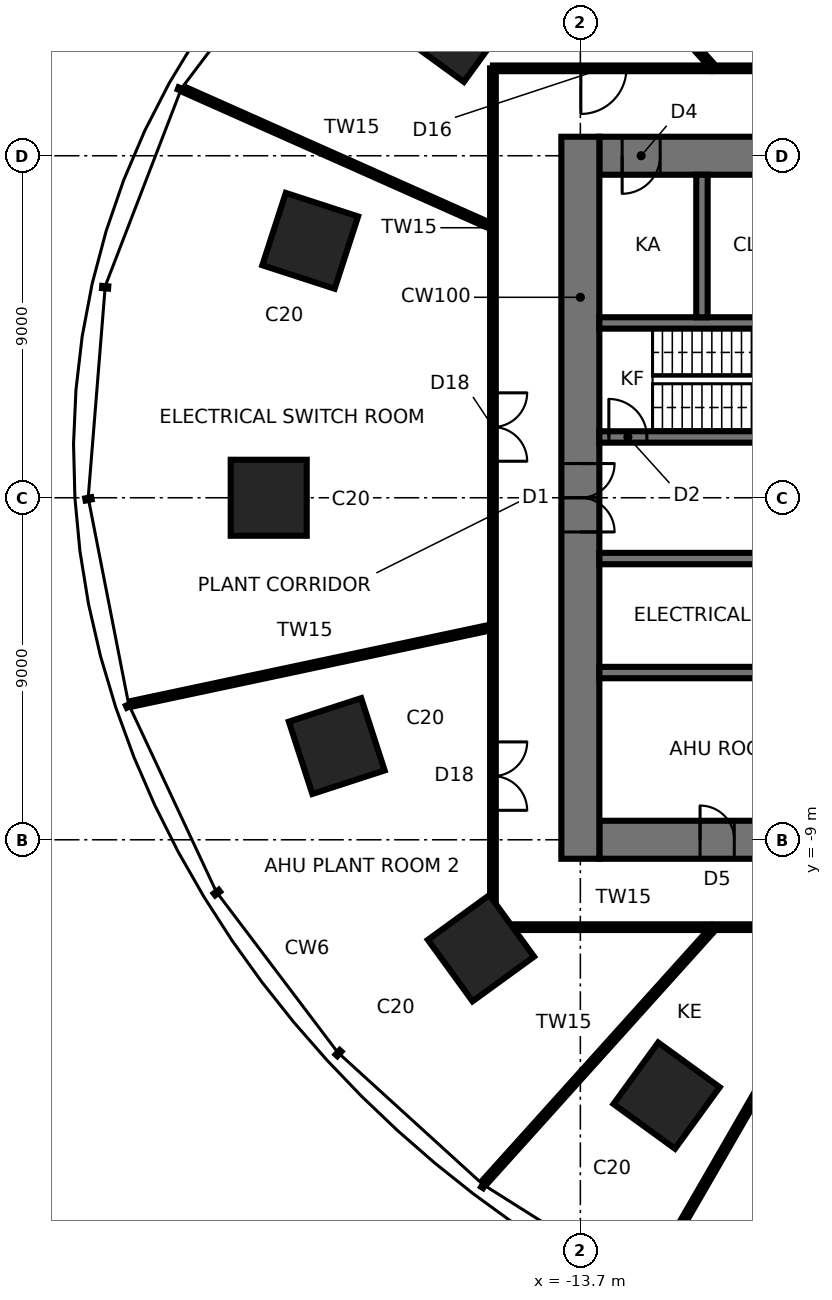
"""IFC4 building model, lengths in metres.
Left out: names, types, materials, properties, quantities, classifications, styles, units other than length and angle.
Written with IfcOpenShell. Run it as: python <this file> out.ifc"""

import sys

from ifc_helpers import new_model, si_unit, direction, frame, frame_2d, origin, origin_2d, place, context, subcontext, project, spatial, rectangle, extrude, element, fill, save


model = new_model("IFC4")
c1 = context("Model", 3, precision=1e-05, world=origin(), true_north=direction((0.0, 1.0)))
c2 = subcontext(c1, "Body", "Model", "MODEL_VIEW")
j1 = project(units=[si_unit("LENGTHUNIT", "METRE"), si_unit("PLANEANGLEUNIT", "RADIAN")], contexts=[c1])
p1 = place(None, origin())
s1 = spatial("IfcSite", under=j1, at=p1, CompositionType="ELEMENT")
p2 = place(p1, origin())
s2 = spatial("IfcBuilding", under=s1, at=p2, CompositionType="ELEMENT")
p3 = place(p2, frame((0.0, 0.0, 86.8)))
s3 = spatial("IfcBuildingStorey", under=s2, at=p3, CompositionType="ELEMENT", Elevation=86.8)
for number, where, z_axis, x_axis in (
    (1, (-16.986, 12.341, 0.0), (0.0, 0.0, 1.0), (-0.809, 0.588, 0.0)),
    (2, (-20.808, 6.761, 0.0), (0.0, 0.0, 1.0), (-0.951, 0.309, 0.0)),
    (3, (-21.9, 0.0, 0.0), (0.0, 0.0, 1.0), (-1.0, 0.0, 0.0)),
    (4, (-20.109, -6.534, 0.0), (0.0, 0.0, 1.0), (-0.951, -0.309, 0.0)),
    (5, (-16.315, -11.854, 0.0), (0.0, 0.0, 1.0), (-0.809, -0.588, 0.0)),
    (6, (-11.43, -15.733, 0.0), (0.0, 0.0, 1.0), (-0.588, -0.809, 0.0)),
):
    element("IfcColumn", number, at=place(p3, frame(where, z_axis=z_axis, x_axis=x_axis)), inside=s3, PredefinedType="COLUMN", context=c2, shape_type="SweptSolid", body=[
        extrude(rectangle(XDim=2.0, YDim=2.0, at=origin_2d()), origin(), (0.0, 0.0, 1.0), 5.6),
    ])
p4 = place(p3, frame((-13.2, -9.0, 0.0), z_axis=(0.0, 0.0, 1.0), x_axis=(1.0, 0.0, 0.0)))
e7 = element("IfcWall", 7, at=p4, inside=s3, PredefinedType="SHEAR", context=c2, shape_type="SweptSolid", body=[
    extrude(rectangle(XDim=26.4, YDim=1.0, at=frame_2d((13.2, 0.0))), origin(), (0.0, 0.0, 1.0), 5.6),
])
p5 = place(p4, frame((2.65, 0.0, 0.0)))
e8 = element("IfcOpeningElement", 8, at=p5, cuts=e7, PredefinedType="OPENING", context=c2, shape_type="SweptSolid", body=[
    extrude(rectangle(XDim=0.9, YDim=2.1, at=frame_2d((0.45, 1.05))), frame((0.0, 0.51, 0.0), z_axis=(0.0, -1.0, 0.0), x_axis=(1.0, 0.0, 0.0)), (0.0, 0.0, 1.0), 1.02),
])
p6 = place(p4, frame((9.5, 0.0, 0.0)))
e9 = element("IfcOpeningElement", 9, at=p6, cuts=e7, PredefinedType="OPENING", context=c2, shape_type="SweptSolid", body=[
    extrude(rectangle(XDim=0.9, YDim=2.1, at=frame_2d((0.45, 1.05))), frame((0.0, 0.51, 0.0), z_axis=(0.0, -1.0, 0.0), x_axis=(1.0, 0.0, 0.0)), (0.0, 0.0, 1.0), 1.02),
])
p7 = place(p4, frame((16.0, 0.0, 0.0)))
e10 = element("IfcOpeningElement", 10, at=p7, cuts=e7, PredefinedType="OPENING", context=c2, shape_type="SweptSolid", body=[
    extrude(rectangle(XDim=0.9, YDim=2.1, at=frame_2d((0.45, 1.05))), frame((0.0, 0.51, 0.0), z_axis=(0.0, -1.0, 0.0), x_axis=(1.0, 0.0, 0.0)), (0.0, 0.0, 1.0), 1.02),
])
p8 = place(p4, frame((22.85, 0.0, 0.0)))
e11 = element("IfcOpeningElement", 11, at=p8, cuts=e7, PredefinedType="OPENING", context=c2, shape_type="SweptSolid", body=[
    extrude(rectangle(XDim=0.9, YDim=2.1, at=frame_2d((0.45, 1.05))), frame((0.0, 0.51, 0.0), z_axis=(0.0, -1.0, 0.0), x_axis=(1.0, 0.0, 0.0)), (0.0, 0.0, 1.0), 1.02),
])
p9 = place(p3, frame((13.2, 9.0, 0.0), z_axis=(0.0, 0.0, 1.0), x_axis=(-1.0, 0.0, 0.0)))
e12 = element("IfcWall", 12, at=p9, inside=s3, PredefinedType="SHEAR", context=c2, shape_type="SweptSolid", body=[
    extrude(rectangle(XDim=26.4, YDim=1.0, at=frame_2d((13.2, 0.0))), origin(), (0.0, 0.0, 1.0), 5.6),
])
p10 = place(p9, frame((2.65, 0.0, 0.0)))
e13 = element("IfcOpeningElement", 13, at=p10, cuts=e12, PredefinedType="OPENING", context=c2, shape_type="SweptSolid", body=[
    extrude(rectangle(XDim=0.9, YDim=2.1, at=frame_2d((0.45, 1.05))), frame((0.0, 0.51, 0.0), z_axis=(0.0, -1.0, 0.0), x_axis=(1.0, 0.0, 0.0)), (0.0, 0.0, 1.0), 1.02),
])
p11 = place(p9, frame((9.5, 0.0, 0.0)))
e14 = element("IfcOpeningElement", 14, at=p11, cuts=e12, PredefinedType="OPENING", context=c2, shape_type="SweptSolid", body=[
    extrude(rectangle(XDim=0.9, YDim=2.1, at=frame_2d((0.45, 1.05))), frame((0.0, 0.51, 0.0), z_axis=(0.0, -1.0, 0.0), x_axis=(1.0, 0.0, 0.0)), (0.0, 0.0, 1.0), 1.02),
])
p12 = place(p9, frame((16.0, 0.0, 0.0)))
e15 = element("IfcOpeningElement", 15, at=p12, cuts=e12, PredefinedType="OPENING", context=c2, shape_type="SweptSolid", body=[
    extrude(rectangle(XDim=0.9, YDim=2.1, at=frame_2d((0.45, 1.05))), frame((0.0, 0.51, 0.0), z_axis=(0.0, -1.0, 0.0), x_axis=(1.0, 0.0, 0.0)), (0.0, 0.0, 1.0), 1.02),
])
p13 = place(p9, frame((21.25, 0.0, 0.0)))
e16 = element("IfcOpeningElement", 16, at=p13, cuts=e12, PredefinedType="OPENING", context=c2, shape_type="SweptSolid", body=[
    extrude(rectangle(XDim=0.9, YDim=2.1, at=frame_2d((0.45, 1.05))), frame((0.0, 0.51, 0.0), z_axis=(0.0, -1.0, 0.0), x_axis=(1.0, 0.0, 0.0)), (0.0, 0.0, 1.0), 1.02),
])
p14 = place(p9, frame((24.8, 0.0, 0.0)))
e17 = element("IfcOpeningElement", 17, at=p14, cuts=e12, PredefinedType="OPENING", context=c2, shape_type="SweptSolid", body=[
    extrude(rectangle(XDim=1.0, YDim=2.1, at=frame_2d((0.5, 1.05))), frame((0.0, 0.51, 0.0), z_axis=(0.0, -1.0, 0.0), x_axis=(1.0, 0.0, 0.0)), (0.0, 0.0, 1.0), 1.02),
])
p15 = place(p3, frame((-13.7, 9.5, 0.0), z_axis=(0.0, 0.0, 1.0), x_axis=(0.0, -1.0, 0.0)))
e18 = element("IfcWall", 18, at=p15, inside=s3, PredefinedType="SHEAR", context=c2, shape_type="SweptSolid", body=[
    extrude(rectangle(XDim=19.0, YDim=1.0, at=frame_2d((9.5, 0.0))), origin(), (0.0, 0.0, 1.0), 5.6),
])
p16 = place(p15, frame((8.6, 0.0, 0.0)))
e19 = element("IfcOpeningElement", 19, at=p16, cuts=e18, PredefinedType="OPENING", context=c2, shape_type="SweptSolid", body=[
    extrude(rectangle(XDim=1.8, YDim=2.4, at=frame_2d((0.9, 1.2))), frame((0.0, 0.51, 0.0), z_axis=(0.0, -1.0, 0.0), x_axis=(1.0, 0.0, 0.0)), (0.0, 0.0, 1.0), 1.02),
])
p17 = place(p3, frame((-13.2, 1.6, 0.0), z_axis=(0.0, 0.0, 1.0), x_axis=(1.0, 0.0, 0.0)))
e20 = element("IfcWall", 20, at=p17, inside=s3, PredefinedType="SHEAR", context=c2, shape_type="SweptSolid", body=[
    extrude(rectangle(XDim=26.4, YDim=0.3, at=frame_2d((13.2, 0.0))), origin(), (0.0, 0.0, 1.0), 5.6),
])
p18 = place(p17, frame((0.25, 0.0, 0.0)))
e21 = element("IfcOpeningElement", 21, at=p18, cuts=e20, PredefinedType="OPENING", context=c2, shape_type="SweptSolid", body=[
    extrude(rectangle(XDim=1.0, YDim=2.1, at=frame_2d((0.5, 1.05))), frame((0.0, 0.16, 0.0), z_axis=(0.0, -1.0, 0.0), x_axis=(1.0, 0.0, 0.0)), (0.0, 0.0, 1.0), 0.32),
])
p19 = place(p17, frame((20.25, 0.0, 0.0)))
e22 = element("IfcOpeningElement", 22, at=p19, cuts=e20, PredefinedType="OPENING", context=c2, shape_type="SweptSolid", body=[
    extrude(rectangle(XDim=1.5, YDim=2.4, at=frame_2d((0.75, 1.2))), frame((0.0, 0.16, 0.0), z_axis=(0.0, -1.0, 0.0), x_axis=(1.0, 0.0, 0.0)), (0.0, 0.0, 1.0), 0.32),
])
p20 = place(p17, frame((7.55, 0.0, 0.0)))
e23 = element("IfcOpeningElement", 23, at=p20, cuts=e20, PredefinedType="OPENING", context=c2, shape_type="SweptSolid", body=[
    extrude(rectangle(XDim=0.9, YDim=2.1, at=frame_2d((0.45, 1.05))), frame((0.0, 0.16, 0.0), z_axis=(0.0, -1.0, 0.0), x_axis=(1.0, 0.0, 0.0)), (0.0, 0.0, 1.0), 0.32),
])
p21 = place(p17, frame((10.15, 0.0, 0.0)))
e24 = element("IfcOpeningElement", 24, at=p21, cuts=e20, PredefinedType="OPENING", context=c2, shape_type="SweptSolid", body=[
    extrude(rectangle(XDim=0.9, YDim=2.1, at=frame_2d((0.45, 1.05))), frame((0.0, 0.16, 0.0), z_axis=(0.0, -1.0, 0.0), x_axis=(1.0, 0.0, 0.0)), (0.0, 0.0, 1.0), 0.32),
])
p22 = place(p17, frame((12.75, 0.0, 0.0)))
e25 = element("IfcOpeningElement", 25, at=p22, cuts=e20, PredefinedType="OPENING", context=c2, shape_type="SweptSolid", body=[
    extrude(rectangle(XDim=0.9, YDim=2.1, at=frame_2d((0.45, 1.05))), frame((0.0, 0.16, 0.0), z_axis=(0.0, -1.0, 0.0), x_axis=(1.0, 0.0, 0.0)), (0.0, 0.0, 1.0), 0.32),
])
p23 = place(p17, frame((24.15, 0.0, 0.0)))
e26 = element("IfcOpeningElement", 26, at=p23, cuts=e20, PredefinedType="OPENING", context=c2, shape_type="SweptSolid", body=[
    extrude(rectangle(XDim=0.9, YDim=2.1, at=frame_2d((0.45, 1.05))), frame((0.0, 0.16, 0.0), z_axis=(0.0, -1.0, 0.0), x_axis=(1.0, 0.0, 0.0)), (0.0, 0.0, 1.0), 0.32),
])
p24 = place(p3, frame((-13.2, -1.6, 0.0), z_axis=(0.0, 0.0, 1.0), x_axis=(1.0, 0.0, 0.0)))
e27 = element("IfcWall", 27, at=p24, inside=s3, PredefinedType="SHEAR", context=c2, shape_type="SweptSolid", body=[
    extrude(rectangle(XDim=26.4, YDim=0.3, at=frame_2d((13.2, 0.0))), origin(), (0.0, 0.0, 1.0), 5.6),
])
p25 = place(p24, frame((25.15, 0.0, 0.0)))
e28 = element("IfcOpeningElement", 28, at=p25, cuts=e27, PredefinedType="OPENING", context=c2, shape_type="SweptSolid", body=[
    extrude(rectangle(XDim=1.0, YDim=2.1, at=frame_2d((0.5, 1.05))), frame((0.0, 0.16, 0.0), z_axis=(0.0, -1.0, 0.0), x_axis=(1.0, 0.0, 0.0)), (0.0, 0.0, 1.0), 0.32),
])
p26 = place(p24, frame((15.25, 0.0, 0.0)))
e29 = element("IfcOpeningElement", 29, at=p26, cuts=e27, PredefinedType="OPENING", context=c2, shape_type="SweptSolid", body=[
    extrude(rectangle(XDim=1.1, YDim=2.3, at=frame_2d((0.55, 1.15))), frame((0.0, 0.16, 0.0), z_axis=(0.0, -1.0, 0.0), x_axis=(1.0, 0.0, 0.0)), (0.0, 0.0, 1.0), 0.32),
])
p27 = place(p24, frame((17.85, 0.0, 0.0)))
e30 = element("IfcOpeningElement", 30, at=p27, cuts=e27, PredefinedType="OPENING", context=c2, shape_type="SweptSolid", body=[
    extrude(rectangle(XDim=1.1, YDim=2.3, at=frame_2d((0.55, 1.15))), frame((0.0, 0.16, 0.0), z_axis=(0.0, -1.0, 0.0), x_axis=(1.0, 0.0, 0.0)), (0.0, 0.0, 1.0), 0.32),
])
p28 = place(p24, frame((5.55, 0.0, 0.0)))
e31 = element("IfcOpeningElement", 31, at=p28, cuts=e27, PredefinedType="OPENING", context=c2, shape_type="SweptSolid", body=[
    extrude(rectangle(XDim=0.9, YDim=2.1, at=frame_2d((0.45, 1.05))), frame((0.0, 0.16, 0.0), z_axis=(0.0, -1.0, 0.0), x_axis=(1.0, 0.0, 0.0)), (0.0, 0.0, 1.0), 0.32),
])
for number, where, z_axis, x_axis in (
    (32, (-13.2, 4.6, 0.0), (0.0, 0.0, 1.0), (1.0, 0.0, 0.0)),
    (33, (-13.2, -4.6, 0.0), (0.0, 0.0, 1.0), (1.0, 0.0, 0.0)),
):
    element("IfcWall", number, at=place(p3, frame(where, z_axis=z_axis, x_axis=x_axis)), inside=s3, PredefinedType="SHEAR", context=c2, shape_type="SweptSolid", body=[
        extrude(rectangle(XDim=26.4, YDim=0.3, at=frame_2d((13.2, 0.0))), origin(), (0.0, 0.0, 1.0), 5.6),
    ])
p29 = place(p3, frame((-10.5, 4.75, 0.0), z_axis=(0.0, 0.0, 1.0), x_axis=(0.0, 1.0, 0.0)))
e34 = element("IfcWall", 34, at=p29, inside=s3, PredefinedType="SHEAR", context=c2, shape_type="SweptSolid", body=[
    extrude(rectangle(XDim=3.75, YDim=0.3, at=frame_2d((1.875, 0.0))), origin(), (0.0, 0.0, 1.0), 5.6),
])
p30 = place(p3, frame((-16.0, -3.401, 0.0), z_axis=(0.0, 0.0, 1.0), x_axis=(-0.978145186273, -0.207923049637, 0.0)))
e35 = element("IfcWall", 35, at=p30, inside=s3, PredefinedType="PARTITIONING", context=c2, shape_type="SweptSolid", body=[
    extrude(rectangle(XDim=9.719, YDim=0.15, at=frame_2d((4.859, 0.0))), origin(), (0.0, 0.0, 1.0), 5.4),
])
p31 = place(p3, frame((-10.175, -11.3, 0.0), z_axis=(0.0, 0.0, 1.0), x_axis=(-0.669136564673, -0.743139460544, 0.0)))
e36 = element("IfcWall", 36, at=p31, inside=s3, PredefinedType="PARTITIONING", context=c2, shape_type="SweptSolid", body=[
    extrude(rectangle(XDim=9.026, YDim=0.15, at=frame_2d((4.513, 0.0))), origin(), (0.0, 0.0, 1.0), 5.4),
])
p32 = place(p3, frame((-6.524, -11.3, 0.0), z_axis=(0.0, 0.0, 1.0), x_axis=(-0.499989292232, -0.866031585829, 0.0)))
e37 = element("IfcWall", 37, at=p32, inside=s3, PredefinedType="PARTITIONING", context=c2, shape_type="SweptSolid", body=[
    extrude(rectangle(XDim=10.85, YDim=0.15, at=frame_2d((5.425, 0.0))), origin(), (0.0, 0.0, 1.0), 5.4),
])
p33 = place(p3, frame((-16.0, -11.3, 0.0), z_axis=(0.0, 0.0, 1.0), x_axis=(1.0, 0.0, 0.0)))
e38 = element("IfcWall", 38, at=p33, inside=s3, PredefinedType="PARTITIONING", context=c2, shape_type="SweptSolid", body=[
    extrude(rectangle(XDim=32.0, YDim=0.15, at=frame_2d((16.0, 0.0))), origin(), (0.0, 0.0, 1.0), 5.4),
])
p34 = place(p33, frame((7.026, 0.0, 0.0)))
e39 = element("IfcOpeningElement", 39, at=p34, cuts=e38, PredefinedType="OPENING", context=c2, shape_type="SweptSolid", body=[
    extrude(rectangle(XDim=1.2, YDim=2.1, at=frame_2d((0.6, 1.05))), frame((0.0, 0.085, 0.0), z_axis=(0.0, -1.0, 0.0), x_axis=(1.0, 0.0, 0.0)), (0.0, 0.0, 1.0), 0.17),
])
p35 = place(p33, frame((11.544, 0.0, 0.0)))
e40 = element("IfcOpeningElement", 40, at=p35, cuts=e38, PredefinedType="OPENING", context=c2, shape_type="SweptSolid", body=[
    extrude(rectangle(XDim=1.2, YDim=2.1, at=frame_2d((0.6, 1.05))), frame((0.0, 0.085, 0.0), z_axis=(0.0, -1.0, 0.0), x_axis=(1.0, 0.0, 0.0)), (0.0, 0.0, 1.0), 0.17),
])
p36 = place(p33, frame((17.768, 0.0, 0.0)))
e41 = element("IfcOpeningElement", 41, at=p36, cuts=e38, PredefinedType="OPENING", context=c2, shape_type="SweptSolid", body=[
    extrude(rectangle(XDim=1.8, YDim=2.4, at=frame_2d((0.9, 1.2))), frame((0.0, 0.085, 0.0), z_axis=(0.0, -1.0, 0.0), x_axis=(1.0, 0.0, 0.0)), (0.0, 0.0, 1.0), 0.17),
])
p37 = place(p33, frame((26.387, 0.0, 0.0)))
e42 = element("IfcOpeningElement", 42, at=p37, cuts=e38, PredefinedType="OPENING", context=c2, shape_type="SweptSolid", body=[
    extrude(rectangle(XDim=1.8, YDim=2.4, at=frame_2d((0.9, 1.2))), frame((0.0, 0.085, 0.0), z_axis=(0.0, -1.0, 0.0), x_axis=(1.0, 0.0, 0.0)), (0.0, 0.0, 1.0), 0.17),
])
p38 = place(p3, frame((16.0, 11.3, 0.0), z_axis=(0.0, 0.0, 1.0), x_axis=(-1.0, 0.0, 0.0)))
e43 = element("IfcWall", 43, at=p38, inside=s3, PredefinedType="PARTITIONING", context=c2, shape_type="SweptSolid", body=[
    extrude(rectangle(XDim=32.0, YDim=0.15, at=frame_2d((16.0, 0.0))), origin(), (0.0, 0.0, 1.0), 5.4),
])
p39 = place(p38, frame((7.026, 0.0, 0.0)))
e44 = element("IfcOpeningElement", 44, at=p39, cuts=e43, PredefinedType="OPENING", context=c2, shape_type="SweptSolid", body=[
    extrude(rectangle(XDim=1.2, YDim=2.1, at=frame_2d((0.6, 1.05))), frame((0.0, 0.085, 0.0), z_axis=(0.0, -1.0, 0.0), x_axis=(1.0, 0.0, 0.0)), (0.0, 0.0, 1.0), 0.17),
])
p40 = place(p38, frame((11.544, 0.0, 0.0)))
e45 = element("IfcOpeningElement", 45, at=p40, cuts=e43, PredefinedType="OPENING", context=c2, shape_type="SweptSolid", body=[
    extrude(rectangle(XDim=1.2, YDim=2.1, at=frame_2d((0.6, 1.05))), frame((0.0, 0.085, 0.0), z_axis=(0.0, -1.0, 0.0), x_axis=(1.0, 0.0, 0.0)), (0.0, 0.0, 1.0), 0.17),
])
p41 = place(p38, frame((19.618, 0.0, 0.0)))
e46 = element("IfcOpeningElement", 46, at=p41, cuts=e43, PredefinedType="OPENING", context=c2, shape_type="SweptSolid", body=[
    extrude(rectangle(XDim=1.8, YDim=2.4, at=frame_2d((0.9, 1.2))), frame((0.0, 0.085, 0.0), z_axis=(0.0, -1.0, 0.0), x_axis=(1.0, 0.0, 0.0)), (0.0, 0.0, 1.0), 0.17),
])
p42 = place(p38, frame((28.487, 0.0, 0.0)))
e47 = element("IfcOpeningElement", 47, at=p42, cuts=e43, PredefinedType="OPENING", context=c2, shape_type="SweptSolid", body=[
    extrude(rectangle(XDim=1.2, YDim=2.1, at=frame_2d((0.6, 1.05))), frame((0.0, 0.085, 0.0), z_axis=(0.0, -1.0, 0.0), x_axis=(1.0, 0.0, 0.0)), (0.0, 0.0, 1.0), 0.17),
])
p43 = place(p3, frame((-10.175, 11.3, 0.0), z_axis=(0.0, 0.0, 1.0), x_axis=(-0.669134495154, 0.743141323972, 0.0)))
e48 = element("IfcWall", 48, at=p43, inside=s3, PredefinedType="PARTITIONING", context=c2, shape_type="SweptSolid", body=[
    extrude(rectangle(XDim=9.613, YDim=0.15, at=frame_2d((4.807, 0.0))), origin(), (0.0, 0.0, 1.0), 5.4),
])
p44 = place(p3, frame((-16.0, 7.124, 0.0), z_axis=(0.0, 0.0, 1.0), x_axis=(-0.913550959064, 0.406724286457, 0.0)))
e49 = element("IfcWall", 49, at=p44, inside=s3, PredefinedType="PARTITIONING", context=c2, shape_type="SweptSolid", body=[
    extrude(rectangle(XDim=8.892, YDim=0.15, at=frame_2d((4.446, 0.0))), origin(), (0.0, 0.0, 1.0), 5.4),
])
p45 = place(p3, frame((-16.0, 11.3, 0.0), z_axis=(0.0, 0.0, 1.0), x_axis=(0.0, -1.0, 0.0)))
e50 = element("IfcWall", 50, at=p45, inside=s3, PredefinedType="PARTITIONING", context=c2, shape_type="SweptSolid", body=[
    extrude(rectangle(XDim=22.6, YDim=0.15, at=frame_2d((11.3, 0.0))), origin(), (0.0, 0.0, 1.0), 5.4),
])
p46 = place(p45, frame((8.539, 0.0, 0.0)))
e51 = element("IfcOpeningElement", 51, at=p46, cuts=e50, PredefinedType="OPENING", context=c2, shape_type="SweptSolid", body=[
    extrude(rectangle(XDim=1.8, YDim=2.4, at=frame_2d((0.9, 1.2))), frame((0.0, 0.085, 0.0), z_axis=(0.0, -1.0, 0.0), x_axis=(1.0, 0.0, 0.0)), (0.0, 0.0, 1.0), 0.17),
])
p47 = place(p45, frame((17.725, 0.0, 0.0)))
e52 = element("IfcOpeningElement", 52, at=p47, cuts=e50, PredefinedType="OPENING", context=c2, shape_type="SweptSolid", body=[
    extrude(rectangle(XDim=1.8, YDim=2.4, at=frame_2d((0.9, 1.2))), frame((0.0, 0.085, 0.0), z_axis=(0.0, -1.0, 0.0), x_axis=(1.0, 0.0, 0.0)), (0.0, 0.0, 1.0), 0.17),
])
p48 = place(p16, origin())
e53 = element("IfcDoor", 53, at=p48, inside=s3, OperationType="DOUBLE_DOOR_SINGLE_SWING", PredefinedType="DOOR", context=c2, shape_type="SweptSolid", body=[
    extrude(rectangle(XDim=1.72, YDim=2.36, at=frame_2d((0.9, 1.18))), frame((0.0, 0.025, 0.0), z_axis=(0.0, -1.0, 0.0), x_axis=(1.0, 0.0, 0.0)), (0.0, 0.0, 1.0), 0.05),
    extrude(rectangle(XDim=0.04, YDim=2.4, at=frame_2d((0.02, 1.2))), frame((0.0, 0.25, 0.0), z_axis=(0.0, -1.0, 0.0), x_axis=(1.0, 0.0, 0.0)), (0.0, 0.0, 1.0), 0.5),
    extrude(rectangle(XDim=0.04, YDim=2.4, at=frame_2d((1.78, 1.2))), frame((0.0, 0.25, 0.0), z_axis=(0.0, -1.0, 0.0), x_axis=(1.0, 0.0, 0.0)), (0.0, 0.0, 1.0), 0.5),
    extrude(rectangle(XDim=1.72, YDim=0.04, at=frame_2d((0.9, 2.38))), frame((0.0, 0.25, 0.0), z_axis=(0.0, -1.0, 0.0), x_axis=(1.0, 0.0, 0.0)), (0.0, 0.0, 1.0), 0.5),
])
fill(e19, e53)
p49 = place(p18, origin())
e54 = element("IfcDoor", 54, at=p49, inside=s3, OperationType="SINGLE_SWING_LEFT", PredefinedType="DOOR", context=c2, shape_type="SweptSolid", body=[
    extrude(rectangle(XDim=1.0, YDim=2.1, at=frame_2d((0.5, 1.05))), frame((0.0, 0.025, 0.0), z_axis=(0.0, -1.0, 0.0), x_axis=(1.0, 0.0, 0.0)), (0.0, 0.0, 1.0), 0.05),
])
fill(e21, e54)
p50 = place(p14, origin())
e55 = element("IfcDoor", 55, at=p50, inside=s3, OperationType="SINGLE_SWING_RIGHT", PredefinedType="DOOR", context=c2, shape_type="SweptSolid", body=[
    extrude(rectangle(XDim=0.92, YDim=2.06, at=frame_2d((0.5, 1.03))), frame((0.0, 0.025, 0.0), z_axis=(0.0, -1.0, 0.0), x_axis=(1.0, 0.0, 0.0)), (0.0, 0.0, 1.0), 0.05),
    extrude(rectangle(XDim=0.04, YDim=2.1, at=frame_2d((0.02, 1.05))), frame((0.0, 0.25, 0.0), z_axis=(0.0, -1.0, 0.0), x_axis=(1.0, 0.0, 0.0)), (0.0, 0.0, 1.0), 0.5),
    extrude(rectangle(XDim=0.04, YDim=2.1, at=frame_2d((0.98, 1.05))), frame((0.0, 0.25, 0.0), z_axis=(0.0, -1.0, 0.0), x_axis=(1.0, 0.0, 0.0)), (0.0, 0.0, 1.0), 0.5),
    extrude(rectangle(XDim=0.92, YDim=0.04, at=frame_2d((0.5, 2.08))), frame((0.0, 0.25, 0.0), z_axis=(0.0, -1.0, 0.0), x_axis=(1.0, 0.0, 0.0)), (0.0, 0.0, 1.0), 0.5),
])
fill(e17, e55)
p51 = place(p5, origin())
e56 = element("IfcDoor", 56, at=p51, inside=s3, OperationType="SINGLE_SWING_LEFT", PredefinedType="DOOR", context=c2, shape_type="SweptSolid", body=[
    extrude(rectangle(XDim=0.82, YDim=2.06, at=frame_2d((0.45, 1.03))), frame((0.0, 0.025, 0.0), z_axis=(0.0, -1.0, 0.0), x_axis=(1.0, 0.0, 0.0)), (0.0, 0.0, 1.0), 0.05),
    extrude(rectangle(XDim=0.04, YDim=2.1, at=frame_2d((0.02, 1.05))), frame((0.0, 0.25, 0.0), z_axis=(0.0, -1.0, 0.0), x_axis=(1.0, 0.0, 0.0)), (0.0, 0.0, 1.0), 0.5),
    extrude(rectangle(XDim=0.04, YDim=2.1, at=frame_2d((0.88, 1.05))), frame((0.0, 0.25, 0.0), z_axis=(0.0, -1.0, 0.0), x_axis=(1.0, 0.0, 0.0)), (0.0, 0.0, 1.0), 0.5),
    extrude(rectangle(XDim=0.82, YDim=0.04, at=frame_2d((0.45, 2.08))), frame((0.0, 0.25, 0.0), z_axis=(0.0, -1.0, 0.0), x_axis=(1.0, 0.0, 0.0)), (0.0, 0.0, 1.0), 0.5),
])
fill(e8, e56)
p52 = place(p42, origin())
e57 = element("IfcDoor", 57, at=p52, inside=s3, OperationType="SINGLE_SWING_RIGHT", PredefinedType="DOOR", context=c2, shape_type="SweptSolid", body=[
    extrude(rectangle(XDim=1.2, YDim=2.1, at=frame_2d((0.6, 1.05))), frame((0.0, 0.025, 0.0), z_axis=(0.0, -1.0, 0.0), x_axis=(1.0, 0.0, 0.0)), (0.0, 0.0, 1.0), 0.05),
])
fill(e47, e57)
p53 = place(p46, origin())
e58 = element("IfcDoor", 58, at=p53, inside=s3, OperationType="DOUBLE_DOOR_SINGLE_SWING", PredefinedType="DOOR", context=c2, shape_type="SweptSolid", body=[
    extrude(rectangle(XDim=1.8, YDim=2.4, at=frame_2d((0.9, 1.2))), frame((0.0, 0.025, 0.0), z_axis=(0.0, -1.0, 0.0), x_axis=(1.0, 0.0, 0.0)), (0.0, 0.0, 1.0), 0.05),
])
fill(e51, e58)
p54 = place(p47, origin())
e59 = element("IfcDoor", 59, at=p54, inside=s3, OperationType="DOUBLE_DOOR_SINGLE_SWING", PredefinedType="DOOR", context=c2, shape_type="SweptSolid", body=[
    extrude(rectangle(XDim=1.8, YDim=2.4, at=frame_2d((0.9, 1.2))), frame((0.0, 0.025, 0.0), z_axis=(0.0, -1.0, 0.0), x_axis=(1.0, 0.0, 0.0)), (0.0, 0.0, 1.0), 0.05),
])
fill(e52, e59)
save(model, sys.argv[1])
